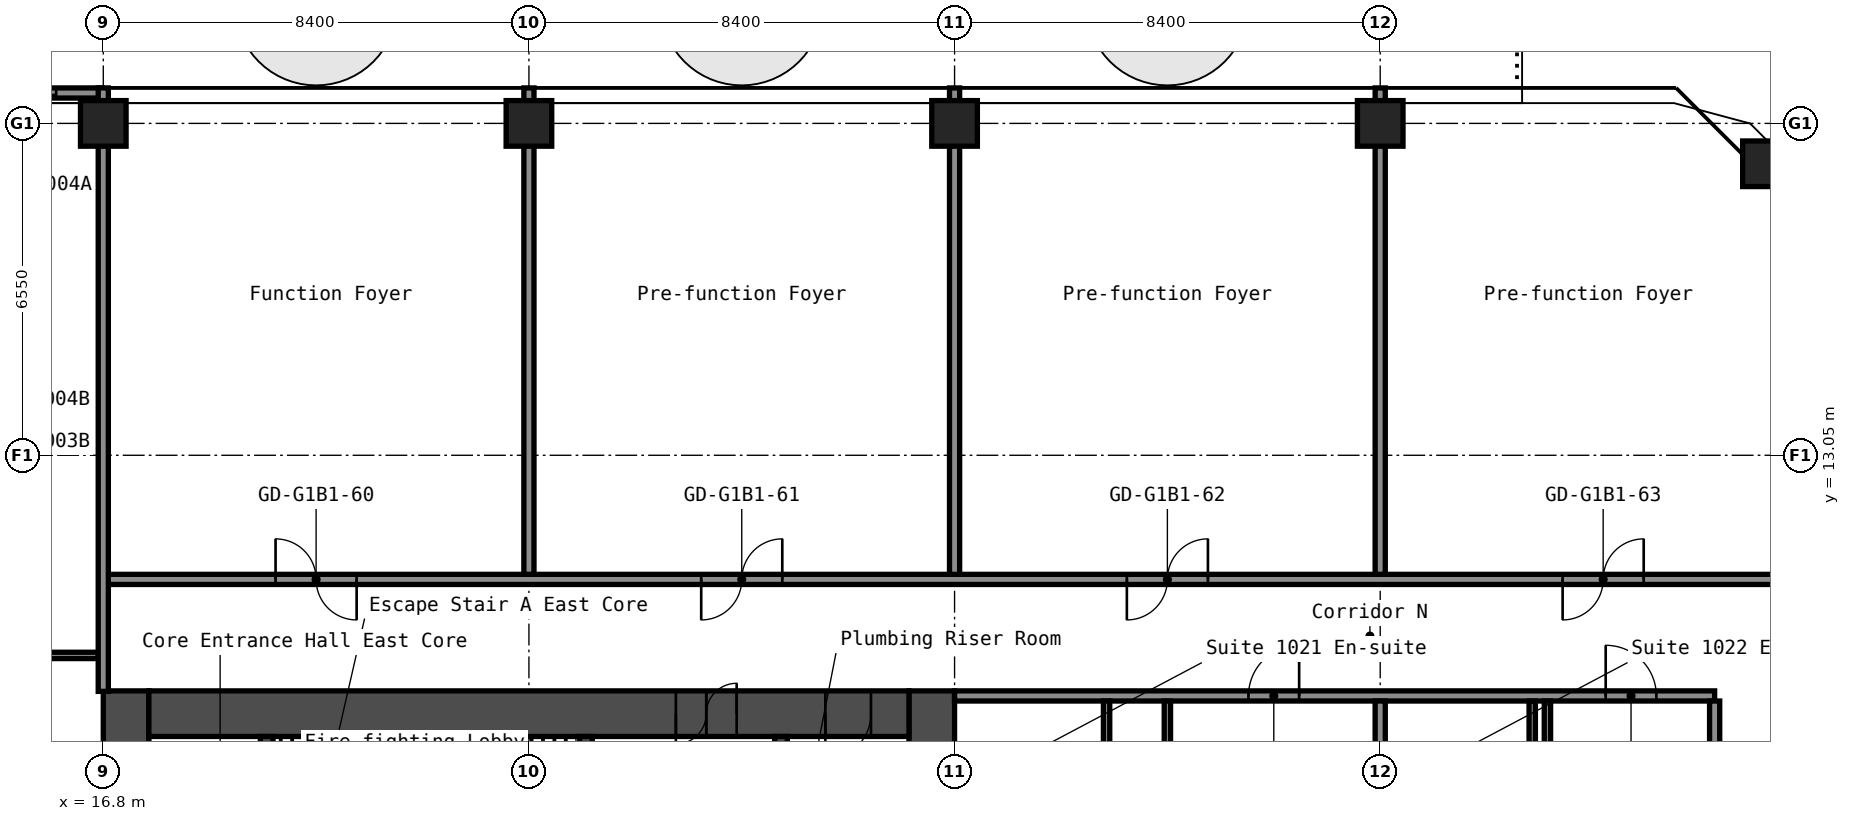
"""IFC4 building model, lengths in metres.
Left out: names, types, materials, properties, quantities, classifications, styles, units other than length and angle.
Written with IfcOpenShell. Run it as: python <this file> out.ifc"""

import sys

from ifc_helpers import new_model, si_unit, direction, frame, frame_2d, origin, origin_2d, place, context, subcontext, project, spatial, rectangle, hollow_rectangle, extrude, element, fill, save


model = new_model("IFC4")
c1 = context("Model", 3, precision=1e-05, world=origin(), true_north=direction((0.0, 1.0)))
c2 = subcontext(c1, "Body", "Model", "MODEL_VIEW")
j1 = project(units=[si_unit("LENGTHUNIT", "METRE"), si_unit("PLANEANGLEUNIT", "RADIAN")], contexts=[c1])
p1 = place(None, origin())
s1 = spatial("IfcSite", under=j1, at=p1, CompositionType="ELEMENT")
p2 = place(p1, origin())
s2 = spatial("IfcBuilding", under=s1, at=p2, CompositionType="ELEMENT")
p3 = place(p2, frame((0.0, 0.0, 39.0)))
s3 = spatial("IfcBuildingStorey", under=s2, at=p3, CompositionType="ELEMENT", Elevation=39.0)
for number, where, z_axis, x_axis in (
    (1, (16.8, 19.6, 0.0), (0.0, 0.0, 1.0), (1.0, 0.0, 0.0)),
    (2, (25.2, 19.6, 0.0), (0.0, 0.0, 1.0), (1.0, 0.0, 0.0)),
    (3, (33.6, 19.6, 0.0), (0.0, 0.0, 1.0), (1.0, 0.0, 0.0)),
    (4, (42.0, 19.6, 0.0), (0.0, 0.0, 1.0), (1.0, 0.0, 0.0)),
    (5, (49.603, 18.803, 0.0), (0.0, 0.0, 1.0), (1.0, 0.0, 0.0)),
):
    element("IfcColumn", number, at=place(p3, frame(where, z_axis=z_axis, x_axis=x_axis)), inside=s3, PredefinedType="COLUMN", context=c2, shape_type="SweptSolid", body=[
        extrude(hollow_rectangle(XDim=0.9, YDim=0.9, WallThickness=0.036, at=origin_2d()), origin(), (0.0, 0.0, 1.0), 2.8),
    ])
p4 = place(p3, frame((17.25, -8.4, 0.0), z_axis=(0.0, 0.0, 1.0), x_axis=(0.0, 1.0, 0.0)))
e6 = element("IfcWall", 6, at=p4, inside=s3, PredefinedType="SHEAR", context=c2, shape_type="SweptSolid", body=[
    extrude(rectangle(XDim=16.8, YDim=0.9, at=frame_2d((8.4, 0.0))), origin(), (0.0, 0.0, 1.0), 2.8),
])
p5 = place(p4, frame((12.75, 0.0, 0.0)))
e7 = element("IfcOpeningElement", 7, at=p5, cuts=e6, PredefinedType="OPENING", context=c2, shape_type="SweptSolid", body=[
    extrude(rectangle(XDim=1.2, YDim=2.1, at=frame_2d((0.6, 1.05))), frame((0.0, 0.46, 0.0), z_axis=(0.0, -1.0, 0.0), x_axis=(1.0, 0.0, 0.0)), (0.0, 0.0, 1.0), 0.92),
])
p6 = place(p4, frame((2.85, 0.0, 0.0)))
e8 = element("IfcOpeningElement", 8, at=p6, cuts=e6, PredefinedType="OPENING", context=c2, shape_type="SweptSolid", body=[
    extrude(rectangle(XDim=1.2, YDim=2.1, at=frame_2d((0.6, 1.05))), frame((0.0, 0.46, 0.0), z_axis=(0.0, -1.0, 0.0), x_axis=(1.0, 0.0, 0.0)), (0.0, 0.0, 1.0), 0.92),
])
p7 = place(p3, frame((33.15, -8.4, 0.0), z_axis=(0.0, 0.0, 1.0), x_axis=(0.0, 1.0, 0.0)))
e9 = element("IfcWall", 9, at=p7, inside=s3, PredefinedType="SHEAR", context=c2, shape_type="SweptSolid", body=[
    extrude(rectangle(XDim=16.8, YDim=0.9, at=frame_2d((8.4, 0.0))), origin(), (0.0, 0.0, 1.0), 2.8),
])
p8 = place(p3, frame((17.7, 7.95, 0.0), z_axis=(0.0, 0.0, 1.0), x_axis=(1.0, 0.0, 0.0)))
e10 = element("IfcWall", 10, at=p8, inside=s3, PredefinedType="SHEAR", context=c2, shape_type="SweptSolid", body=[
    extrude(rectangle(XDim=15.0, YDim=0.9, at=frame_2d((7.5, 0.0))), origin(), (0.0, 0.0, 1.0), 2.8),
])
p9 = place(p8, frame((10.4, 0.0, 0.0)))
e11 = element("IfcOpeningElement", 11, at=p9, cuts=e10, PredefinedType="OPENING", context=c2, shape_type="SweptSolid", body=[
    extrude(rectangle(XDim=1.2, YDim=2.1, at=frame_2d((0.6, 1.05))), frame((0.0, 0.46, 0.0), z_axis=(0.0, -1.0, 0.0), x_axis=(1.0, 0.0, 0.0)), (0.0, 0.0, 1.0), 0.92),
])
p10 = place(p8, frame((13.35, 0.0, 0.0)))
e12 = element("IfcOpeningElement", 12, at=p10, cuts=e10, PredefinedType="OPENING", context=c2, shape_type="SweptSolid", body=[
    extrude(rectangle(XDim=0.9, YDim=2.1, at=frame_2d((0.45, 1.05))), frame((0.0, 0.46, 0.0), z_axis=(0.0, -1.0, 0.0), x_axis=(1.0, 0.0, 0.0)), (0.0, 0.0, 1.0), 0.92),
])
p11 = place(p3, frame((20.025, 1.2, 0.0), z_axis=(0.0, 0.0, 1.0), x_axis=(0.0, 1.0, 0.0)))
e13 = element("IfcWall", 13, at=p11, inside=s3, PredefinedType="SHEAR", context=c2, shape_type="SweptSolid", body=[
    extrude(rectangle(XDim=6.3, YDim=0.25, at=frame_2d((3.15, 0.0))), origin(), (0.0, 0.0, 1.0), 2.8),
])
p12 = place(p3, frame((26.325, 3.75, 0.0), z_axis=(0.0, 0.0, 1.0), x_axis=(0.0, 1.0, 0.0)))
e14 = element("IfcWall", 14, at=p12, inside=s3, PredefinedType="SHEAR", context=c2, shape_type="SweptSolid", body=[
    extrude(rectangle(XDim=3.75, YDim=0.25, at=frame_2d((1.875, 0.0))), origin(), (0.0, 0.0, 1.0), 2.8),
])
p13 = place(p12, frame((1.25, 0.0, 0.0)))
e15 = element("IfcOpeningElement", 15, at=p13, cuts=e14, PredefinedType="OPENING", context=c2, shape_type="SweptSolid", body=[
    extrude(rectangle(XDim=1.2, YDim=2.1, at=frame_2d((0.6, 1.05))), frame((0.0, 0.135, 0.0), z_axis=(0.0, -1.0, 0.0), x_axis=(1.0, 0.0, 0.0)), (0.0, 0.0, 1.0), 0.27),
])
p14 = place(p3, frame((30.175, 1.45, 0.0), z_axis=(0.0, 0.0, 1.0), x_axis=(0.0, 1.0, 0.0)))
e16 = element("IfcWall", 16, at=p14, inside=s3, PredefinedType="SHEAR", context=c2, shape_type="SweptSolid", body=[
    extrude(rectangle(XDim=6.05, YDim=0.25, at=frame_2d((3.025, 0.0))), origin(), (0.0, 0.0, 1.0), 2.8),
])
p15 = place(p14, frame((2.625, 0.0, 0.0)))
e17 = element("IfcOpeningElement", 17, at=p15, cuts=e16, PredefinedType="OPENING", context=c2, shape_type="SweptSolid", body=[
    extrude(rectangle(XDim=1.1, YDim=2.1, at=frame_2d((0.55, 1.05))), frame((0.0, 0.135, 0.0), z_axis=(0.0, -1.0, 0.0), x_axis=(1.0, 0.0, 0.0)), (0.0, 0.0, 1.0), 0.27),
])
p16 = place(p3, frame((33.6, 8.3, 0.0), z_axis=(0.0, 0.0, 1.0), x_axis=(1.0, 0.0, 0.0)))
e18 = element("IfcWall", 18, at=p16, inside=s3, PredefinedType="PARTITIONING", context=c2, shape_type="SweptSolid", body=[
    extrude(rectangle(XDim=15.0, YDim=0.2, at=frame_2d((7.5, 0.0))), origin(), (0.0, 0.0, 1.0), 2.8),
])
p17 = place(p16, frame((5.8, 0.0, 0.0)))
e19 = element("IfcOpeningElement", 19, at=p17, cuts=e18, PredefinedType="OPENING", context=c2, shape_type="SweptSolid", body=[
    extrude(rectangle(XDim=1.0, YDim=2.1, at=frame_2d((0.5, 1.05))), frame((0.0, 0.11, 0.0), z_axis=(0.0, -1.0, 0.0), x_axis=(1.0, 0.0, 0.0)), (0.0, 0.0, 1.0), 0.22),
])
p18 = place(p16, frame((12.85, 0.0, 0.0)))
e20 = element("IfcOpeningElement", 20, at=p18, cuts=e18, PredefinedType="OPENING", context=c2, shape_type="SweptSolid", body=[
    extrude(rectangle(XDim=1.0, YDim=2.1, at=frame_2d((0.5, 1.05))), frame((0.0, 0.11, 0.0), z_axis=(0.0, -1.0, 0.0), x_axis=(1.0, 0.0, 0.0)), (0.0, 0.0, 1.0), 0.22),
])
p19 = place(p3, frame((14.363, 9.1, 0.0), z_axis=(0.0, 0.0, 1.0), x_axis=(1.0, 0.0, 0.0)))
e21 = element("IfcWall", 21, at=p19, inside=s3, PredefinedType="PARTITIONING", context=c2, shape_type="SweptSolid", body=[
    extrude(rectangle(XDim=2.337, YDim=0.125, at=frame_2d((1.169, 0.0))), origin(), (0.0, 0.0, 1.0), 2.8),
])
p20 = place(p3, frame((16.8, 10.6, 0.0), z_axis=(0.0, 0.0, 1.0), x_axis=(1.0, 0.0, 0.0)))
e22 = element("IfcWall", 22, at=p20, inside=s3, PredefinedType="PARTITIONING", context=c2, shape_type="SweptSolid", body=[
    extrude(rectangle(XDim=34.3, YDim=0.2, at=frame_2d((17.15, 0.0))), origin(), (0.0, 0.0, 1.0), 2.8),
])
p21 = place(p20, frame((3.4, 0.0, 0.0)))
e23 = element("IfcOpeningElement", 23, at=p21, cuts=e22, PredefinedType="OPENING", context=c2, shape_type="SweptSolid", body=[
    extrude(rectangle(XDim=1.6, YDim=2.1, at=frame_2d((0.8, 1.05))), frame((0.0, 0.11, 0.0), z_axis=(0.0, -1.0, 0.0), x_axis=(1.0, 0.0, 0.0)), (0.0, 0.0, 1.0), 0.22),
])
p22 = place(p20, frame((11.8, 0.0, 0.0)))
e24 = element("IfcOpeningElement", 24, at=p22, cuts=e22, PredefinedType="OPENING", context=c2, shape_type="SweptSolid", body=[
    extrude(rectangle(XDim=1.6, YDim=2.1, at=frame_2d((0.8, 1.05))), frame((0.0, 0.11, 0.0), z_axis=(0.0, -1.0, 0.0), x_axis=(1.0, 0.0, 0.0)), (0.0, 0.0, 1.0), 0.22),
])
p23 = place(p20, frame((20.2, 0.0, 0.0)))
e25 = element("IfcOpeningElement", 25, at=p23, cuts=e22, PredefinedType="OPENING", context=c2, shape_type="SweptSolid", body=[
    extrude(rectangle(XDim=1.6, YDim=2.1, at=frame_2d((0.8, 1.05))), frame((0.0, 0.11, 0.0), z_axis=(0.0, -1.0, 0.0), x_axis=(1.0, 0.0, 0.0)), (0.0, 0.0, 1.0), 0.22),
])
p24 = place(p20, frame((28.8, 0.0, 0.0)))
e26 = element("IfcOpeningElement", 26, at=p24, cuts=e22, PredefinedType="OPENING", context=c2, shape_type="SweptSolid", body=[
    extrude(rectangle(XDim=1.6, YDim=2.1, at=frame_2d((0.8, 1.05))), frame((0.0, 0.11, 0.0), z_axis=(0.0, -1.0, 0.0), x_axis=(1.0, 0.0, 0.0)), (0.0, 0.0, 1.0), 0.22),
])
p25 = place(p3, frame((16.8, 8.39, 0.0), z_axis=(0.0, 0.0, 1.0), x_axis=(0.0, 1.0, 0.0)))
e27 = element("IfcWall", 27, at=p25, inside=s3, PredefinedType="PARTITIONING", context=c2, shape_type="SweptSolid", body=[
    extrude(rectangle(XDim=11.91, YDim=0.2, at=frame_2d((5.955, 0.0))), origin(), (0.0, 0.0, 1.0), 2.8),
])
for number, where, z_axis, x_axis in (
    (28, (25.2, 10.7, 0.0), (0.0, 0.0, 1.0), (0.0, 1.0, 0.0)),
    (29, (33.6, 10.7, 0.0), (0.0, 0.0, 1.0), (0.0, 1.0, 0.0)),
):
    element("IfcWall", number, at=place(p3, frame(where, z_axis=z_axis, x_axis=x_axis)), inside=s3, PredefinedType="PARTITIONING", context=c2, shape_type="SweptSolid", body=[
        extrude(rectangle(XDim=9.6, YDim=0.2, at=frame_2d((4.8, 0.0))), origin(), (0.0, 0.0, 1.0), 2.8),
    ])
p26 = place(p3, frame((36.6, 5.1, 0.0), z_axis=(0.0, 0.0, 1.0), x_axis=(0.0, 1.0, 0.0)))
e30 = element("IfcWall", 30, at=p26, inside=s3, PredefinedType="PARTITIONING", context=c2, shape_type="SweptSolid", body=[
    extrude(rectangle(XDim=3.1, YDim=0.125, at=frame_2d((1.55, 0.0))), origin(), (0.0, 0.0, 1.0), 2.8),
])
p27 = place(p3, frame((37.8, -8.2, 0.0), z_axis=(0.0, 0.0, 1.0), x_axis=(0.0, 1.0, 0.0)))
e31 = element("IfcWall", 31, at=p27, inside=s3, PredefinedType="PARTITIONING", context=c2, shape_type="SweptSolid", body=[
    extrude(rectangle(XDim=16.4, YDim=0.125, at=frame_2d((8.2, 0.0))), origin(), (0.0, 0.0, 1.0), 2.8),
])
p28 = place(p27, frame((4.05, 0.0, 0.0)))
e32 = element("IfcOpeningElement", 32, at=p28, cuts=e31, PredefinedType="OPENING", context=c2, shape_type="SweptSolid", body=[
    extrude(rectangle(XDim=0.9, YDim=2.1, at=frame_2d((0.45, 1.05))), frame((0.0, 0.073, 0.0), z_axis=(0.0, -1.0, 0.0), x_axis=(1.0, 0.0, 0.0)), (0.0, 0.0, 1.0), 0.145),
])
p29 = place(p27, frame((11.45, 0.0, 0.0)))
e33 = element("IfcOpeningElement", 33, at=p29, cuts=e31, PredefinedType="OPENING", context=c2, shape_type="SweptSolid", body=[
    extrude(rectangle(XDim=0.9, YDim=2.1, at=frame_2d((0.45, 1.05))), frame((0.0, 0.073, 0.0), z_axis=(0.0, -1.0, 0.0), x_axis=(1.0, 0.0, 0.0)), (0.0, 0.0, 1.0), 0.145),
])
p30 = place(p3, frame((42.0, -8.2, 0.0), z_axis=(0.0, 0.0, 1.0), x_axis=(0.0, 1.0, 0.0)))
e34 = element("IfcWall", 34, at=p30, inside=s3, PredefinedType="PARTITIONING", context=c2, shape_type="SweptSolid", body=[
    extrude(rectangle(XDim=16.4, YDim=0.2, at=frame_2d((8.2, 0.0))), origin(), (0.0, 0.0, 1.0), 2.8),
])
p31 = place(p3, frame((42.0, 10.7, 0.0), z_axis=(0.0, 0.0, 1.0), x_axis=(0.0, 1.0, 0.0)))
e35 = element("IfcWall", 35, at=p31, inside=s3, PredefinedType="PARTITIONING", context=c2, shape_type="SweptSolid", body=[
    extrude(rectangle(XDim=9.6, YDim=0.2, at=frame_2d((4.8, 0.0))), origin(), (0.0, 0.0, 1.0), 2.8),
])
p32 = place(p3, frame((45.0, 5.1, 0.0), z_axis=(0.0, 0.0, 1.0), x_axis=(0.0, 1.0, 0.0)))
e36 = element("IfcWall", 36, at=p32, inside=s3, PredefinedType="PARTITIONING", context=c2, shape_type="SweptSolid", body=[
    extrude(rectangle(XDim=3.1, YDim=0.125, at=frame_2d((1.55, 0.0))), origin(), (0.0, 0.0, 1.0), 2.8),
])
p33 = place(p3, frame((45.3, -8.2, 0.0), z_axis=(0.0, 0.0, 1.0), x_axis=(0.0, 1.0, 0.0)))
e37 = element("IfcWall", 37, at=p33, inside=s3, PredefinedType="PARTITIONING", context=c2, shape_type="SweptSolid", body=[
    extrude(rectangle(XDim=16.4, YDim=0.125, at=frame_2d((8.2, 0.0))), origin(), (0.0, 0.0, 1.0), 2.8),
])
p34 = place(p33, frame((4.05, 0.0, 0.0)))
e38 = element("IfcOpeningElement", 38, at=p34, cuts=e37, PredefinedType="OPENING", context=c2, shape_type="SweptSolid", body=[
    extrude(rectangle(XDim=0.9, YDim=2.1, at=frame_2d((0.45, 1.05))), frame((0.0, 0.073, 0.0), z_axis=(0.0, -1.0, 0.0), x_axis=(1.0, 0.0, 0.0)), (0.0, 0.0, 1.0), 0.145),
])
p35 = place(p33, frame((11.45, 0.0, 0.0)))
e39 = element("IfcOpeningElement", 39, at=p35, cuts=e37, PredefinedType="OPENING", context=c2, shape_type="SweptSolid", body=[
    extrude(rectangle(XDim=0.9, YDim=2.1, at=frame_2d((0.45, 1.05))), frame((0.0, 0.073, 0.0), z_axis=(0.0, -1.0, 0.0), x_axis=(1.0, 0.0, 0.0)), (0.0, 0.0, 1.0), 0.145),
])
p36 = place(p3, frame((48.6, -8.2, 0.0), z_axis=(0.0, 0.0, 1.0), x_axis=(0.0, 1.0, 0.0)))
e40 = element("IfcWall", 40, at=p36, inside=s3, PredefinedType="PARTITIONING", context=c2, shape_type="SweptSolid", body=[
    extrude(rectangle(XDim=16.4, YDim=0.2, at=frame_2d((8.2, 0.0))), origin(), (0.0, 0.0, 1.0), 2.8),
])
p37 = place(p3, frame((16.78, 20.2, 0.0), z_axis=(0.0, 0.0, 1.0), x_axis=(-1.0, 0.0, 0.0)))
p38 = place(p37, frame((0.91, 0.0, 0.0)))
p39 = place(p38, frame((2.4, 0.0, 0.0), z_axis=(0.0, 0.0, 1.0), x_axis=(-1.0, 0.0, 0.0)))
e41 = element("IfcDoor", 41, at=p39, inside=s3, OperationType="SLIDING_TO_LEFT", PredefinedType="DOOR", context=c2, shape_type="SweptSolid", body=[
    extrude(rectangle(XDim=2.4, YDim=2.2, at=frame_2d((1.2, 1.1))), frame((0.0, 0.025, 0.0), z_axis=(0.0, -1.0, 0.0), x_axis=(1.0, 0.0, 0.0)), (0.0, 0.0, 1.0), 0.05),
])
p40 = place(p9, origin())
e42 = element("IfcDoor", 42, at=p40, inside=s3, OperationType="DOUBLE_DOOR_SINGLE_SWING", PredefinedType="DOOR", context=c2, shape_type="SweptSolid", body=[
    extrude(rectangle(XDim=1.2, YDim=2.1, at=frame_2d((0.6, 1.05))), frame((0.0, 0.025, 0.0), z_axis=(0.0, -1.0, 0.0), x_axis=(1.0, 0.0, 0.0)), (0.0, 0.0, 1.0), 0.05),
])
fill(e11, e42)
p41 = place(p10, origin())
e43 = element("IfcDoor", 43, at=p41, inside=s3, OperationType="SINGLE_SWING_LEFT", PredefinedType="DOOR", context=c2, shape_type="SweptSolid", body=[
    extrude(rectangle(XDim=0.9, YDim=2.1, at=frame_2d((0.45, 1.05))), frame((0.0, 0.025, 0.0), z_axis=(0.0, -1.0, 0.0), x_axis=(1.0, 0.0, 0.0)), (0.0, 0.0, 1.0), 0.05),
])
fill(e12, e43)
p42 = place(p17, origin())
e44 = element("IfcDoor", 44, at=p42, inside=s3, OperationType="SINGLE_SWING_LEFT", PredefinedType="DOOR", context=c2, shape_type="SweptSolid", body=[
    extrude(rectangle(XDim=1.0, YDim=2.1, at=frame_2d((0.5, 1.05))), frame((0.0, 0.025, 0.0), z_axis=(0.0, -1.0, 0.0), x_axis=(1.0, 0.0, 0.0)), (0.0, 0.0, 1.0), 0.05),
])
fill(e19, e44)
p43 = place(p18, origin())
e45 = element("IfcDoor", 45, at=p43, inside=s3, OperationType="SINGLE_SWING_RIGHT", PredefinedType="DOOR", context=c2, shape_type="SweptSolid", body=[
    extrude(rectangle(XDim=1.0, YDim=2.1, at=frame_2d((0.5, 1.05))), frame((0.0, 0.025, 0.0), z_axis=(0.0, -1.0, 0.0), x_axis=(1.0, 0.0, 0.0)), (0.0, 0.0, 1.0), 0.05),
])
fill(e20, e45)
p44 = place(p21, origin())
e46 = element("IfcDoor", 46, at=p44, inside=s3, OperationType="DOUBLE_DOOR_SINGLE_SWING", PredefinedType="DOOR", context=c2, shape_type="SweptSolid", body=[
    extrude(rectangle(XDim=1.6, YDim=2.1, at=frame_2d((0.8, 1.05))), frame((0.0, 0.025, 0.0), z_axis=(0.0, -1.0, 0.0), x_axis=(1.0, 0.0, 0.0)), (0.0, 0.0, 1.0), 0.05),
])
fill(e23, e46)
p45 = place(p22, origin())
e47 = element("IfcDoor", 47, at=p45, inside=s3, OperationType="DOUBLE_DOOR_SINGLE_SWING", PredefinedType="DOOR", context=c2, shape_type="SweptSolid", body=[
    extrude(rectangle(XDim=1.6, YDim=2.1, at=frame_2d((0.8, 1.05))), frame((0.0, 0.025, 0.0), z_axis=(0.0, -1.0, 0.0), x_axis=(1.0, 0.0, 0.0)), (0.0, 0.0, 1.0), 0.05),
])
fill(e24, e47)
p46 = place(p23, origin())
e48 = element("IfcDoor", 48, at=p46, inside=s3, OperationType="DOUBLE_DOOR_SINGLE_SWING", PredefinedType="DOOR", context=c2, shape_type="SweptSolid", body=[
    extrude(rectangle(XDim=1.6, YDim=2.1, at=frame_2d((0.8, 1.05))), frame((0.0, 0.025, 0.0), z_axis=(0.0, -1.0, 0.0), x_axis=(1.0, 0.0, 0.0)), (0.0, 0.0, 1.0), 0.05),
])
fill(e25, e48)
p47 = place(p24, origin())
e49 = element("IfcDoor", 49, at=p47, inside=s3, OperationType="DOUBLE_DOOR_SINGLE_SWING", PredefinedType="DOOR", context=c2, shape_type="SweptSolid", body=[
    extrude(rectangle(XDim=1.6, YDim=2.1, at=frame_2d((0.8, 1.05))), frame((0.0, 0.025, 0.0), z_axis=(0.0, -1.0, 0.0), x_axis=(1.0, 0.0, 0.0)), (0.0, 0.0, 1.0), 0.05),
])
fill(e26, e49)
save(model, sys.argv[1])
